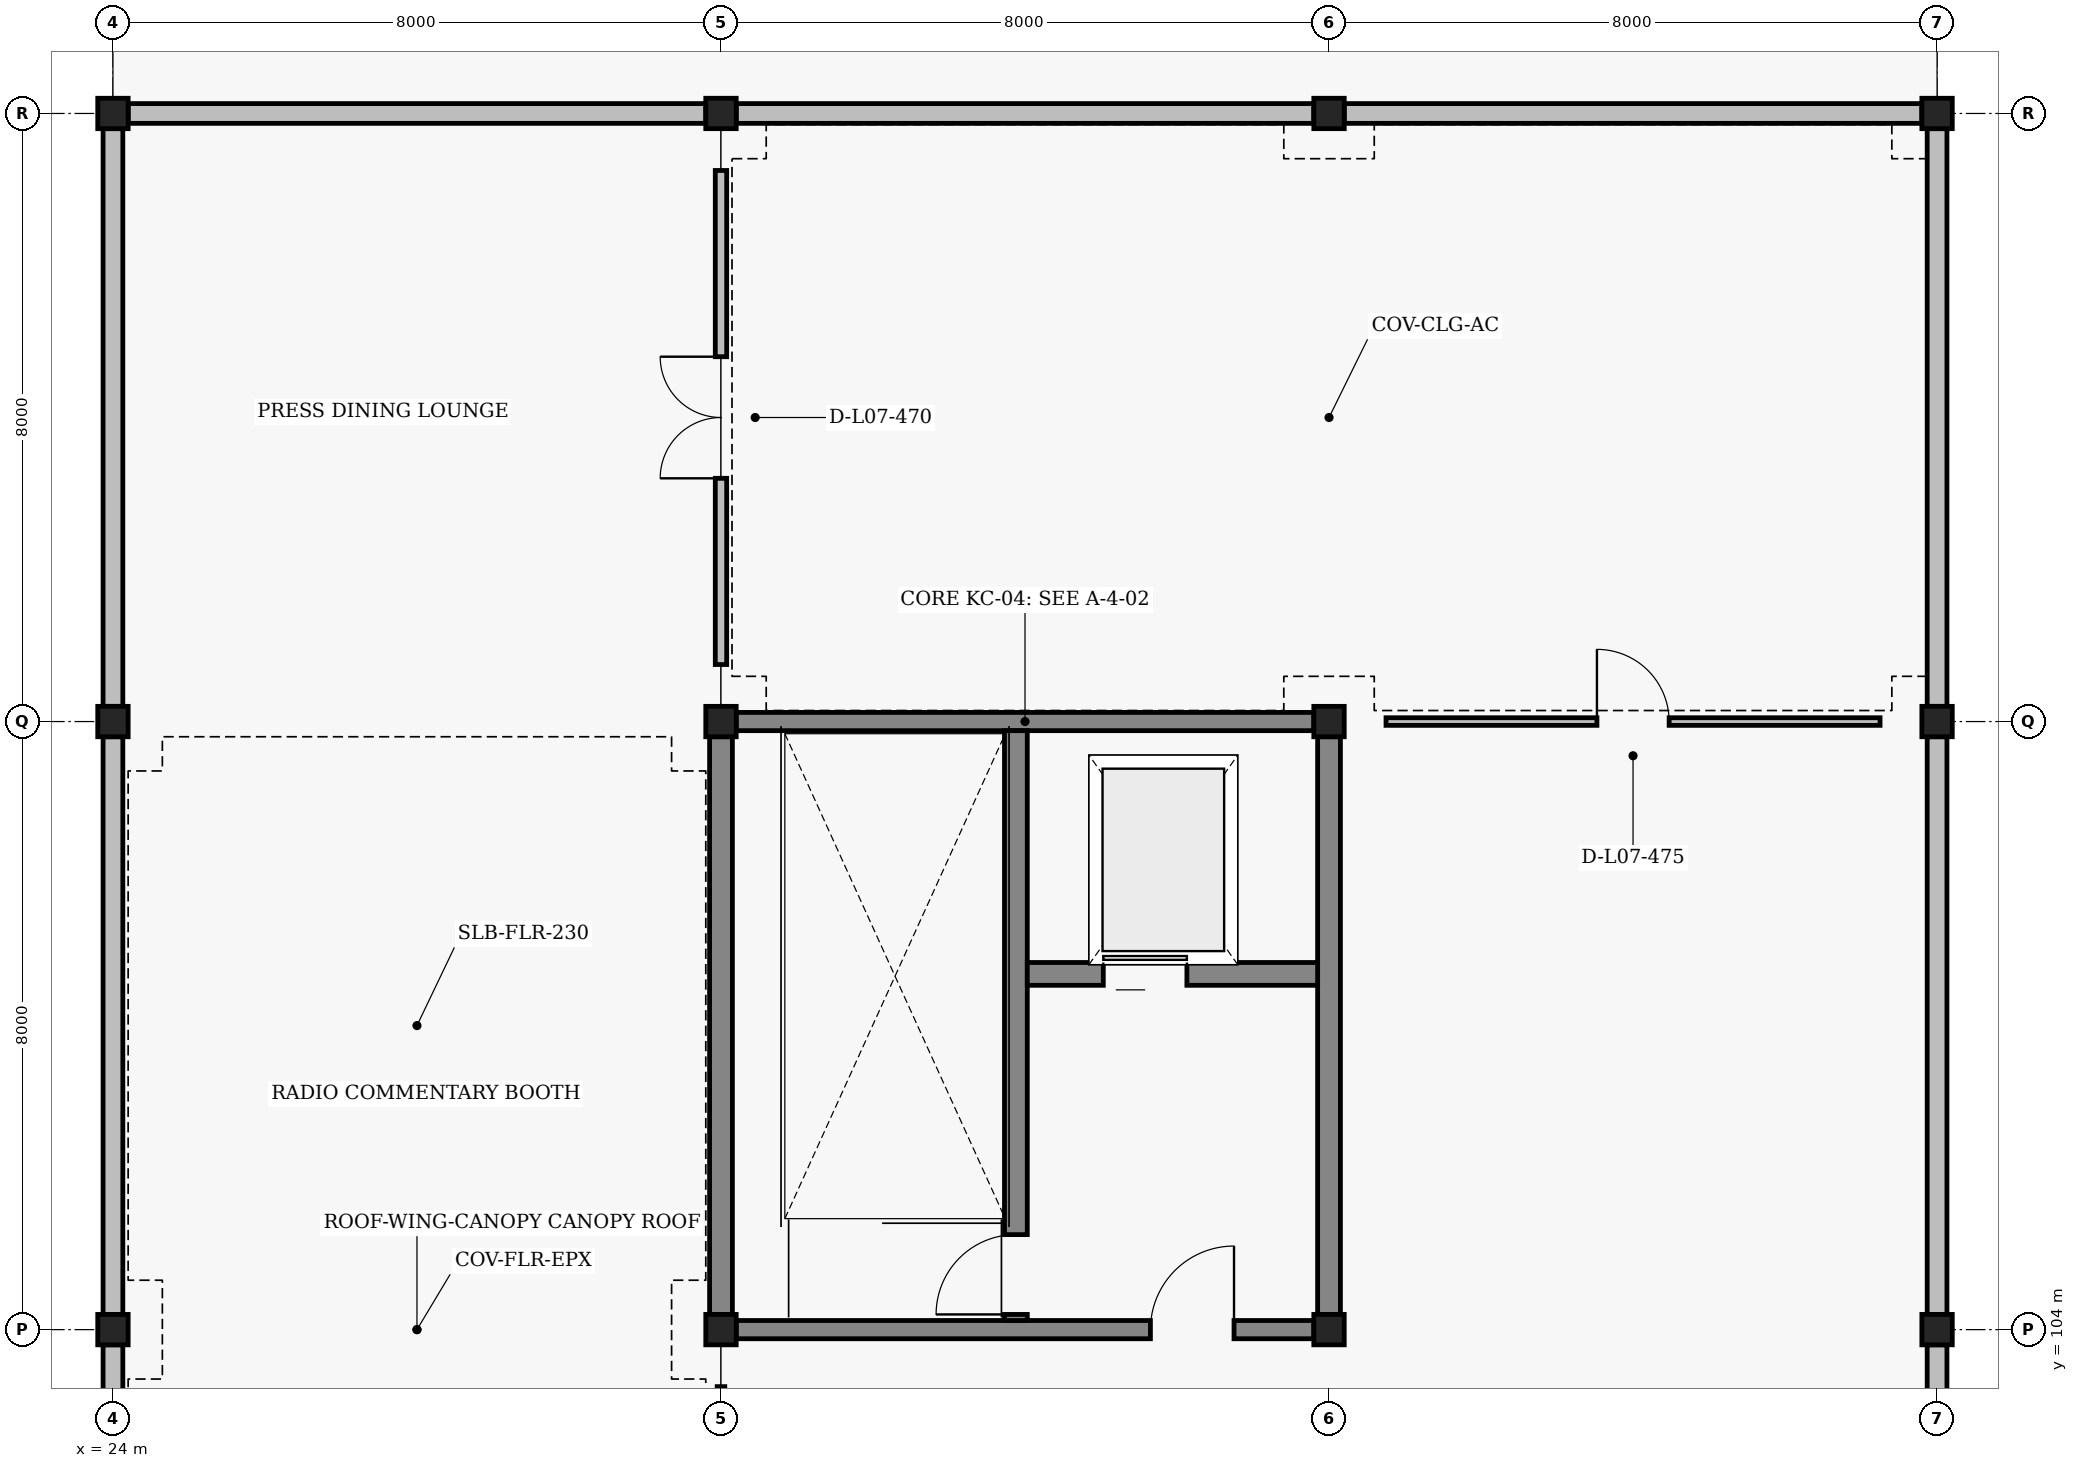
"""IFC4 building model, lengths in metres.
Left out: names, types, materials, properties, quantities, classifications, styles, units other than length and angle.
Written with IfcOpenShell. Run it as: python <this file> out.ifc"""

import sys

from ifc_helpers import new_model, si_unit, direction, frame, frame_2d, origin, origin_2d, place, context, subcontext, project, spatial, rectangle, i_section, extrude, element, fill, save


model = new_model("IFC4")
c1 = context("Model", 3, precision=1e-05, world=origin(), true_north=direction((0.0, 1.0)))
c2 = subcontext(c1, "Body", "Model", "MODEL_VIEW")
j1 = project(units=[si_unit("LENGTHUNIT", "METRE"), si_unit("PLANEANGLEUNIT", "RADIAN")], contexts=[c1])
p1 = place(None, origin())
s1 = spatial("IfcSite", under=j1, at=p1, CompositionType="ELEMENT")
p2 = place(p1, origin())
s2 = spatial("IfcBuilding", under=s1, at=p2, CompositionType="ELEMENT")
p3 = place(p2, frame((0.0, 0.0, 27.0)))
s3 = spatial("IfcBuildingStorey", under=s2, at=p3, CompositionType="ELEMENT", Elevation=27.0)
for number, where, z_axis, x_axis in (
    (1, (24.0, 104.0, 0.0), (0.0, 0.0, 1.0), (1.0, 0.0, 0.0)),
    (2, (24.0, 112.0, 0.0), (0.0, 0.0, 1.0), (1.0, 0.0, 0.0)),
    (3, (24.0, 120.0, 0.0), (0.0, 0.0, 1.0), (1.0, 0.0, 0.0)),
    (4, (32.0, 104.0, 0.0), (0.0, 0.0, 1.0), (1.0, 0.0, 0.0)),
    (5, (32.0, 112.0, 0.0), (0.0, 0.0, 1.0), (1.0, 0.0, 0.0)),
    (6, (32.0, 120.0, 0.0), (0.0, 0.0, 1.0), (1.0, 0.0, 0.0)),
    (7, (40.0, 104.0, 0.0), (0.0, 0.0, 1.0), (1.0, 0.0, 0.0)),
    (8, (40.0, 112.0, 0.0), (0.0, 0.0, 1.0), (1.0, 0.0, 0.0)),
    (9, (40.0, 120.0, 0.0), (0.0, 0.0, 1.0), (1.0, 0.0, 0.0)),
    (10, (48.0, 104.0, 0.0), (0.0, 0.0, 1.0), (1.0, 0.0, 0.0)),
    (11, (48.0, 112.0, 0.0), (0.0, 0.0, 1.0), (1.0, 0.0, 0.0)),
    (12, (48.0, 120.0, 0.0), (0.0, 0.0, 1.0), (1.0, 0.0, 0.0)),
):
    element("IfcColumn", number, at=place(p3, frame(where, z_axis=z_axis, x_axis=x_axis)), inside=s3, PredefinedType="COLUMN", context=c2, shape_type="SweptSolid", body=[
        extrude(i_section(OverallWidth=0.4, OverallDepth=0.4, WebThickness=0.013, FlangeThickness=0.021, at=origin_2d()), origin(), (0.0, 0.0, 1.0), 4.2),
    ])
for number, where, z_axis, x_axis in (
    (13, (24.0, 96.2, 0.0), (0.0, 0.0, 1.0), (0.0, 1.0, 0.0)),
    (14, (24.0, 104.2, 0.0), (0.0, 0.0, 1.0), (0.0, 1.0, 0.0)),
    (15, (24.2, 120.0, 0.0), (0.0, 0.0, 1.0), (1.0, 0.0, 0.0)),
    (16, (24.0, 112.2, 0.0), (0.0, 0.0, 1.0), (0.0, 1.0, 0.0)),
    (17, (32.2, 120.0, 0.0), (0.0, 0.0, 1.0), (1.0, 0.0, 0.0)),
    (18, (48.0, 96.2, 0.0), (0.0, 0.0, 1.0), (0.0, 1.0, 0.0)),
    (19, (48.0, 104.2, 0.0), (0.0, 0.0, 1.0), (0.0, 1.0, 0.0)),
    (20, (40.2, 120.0, 0.0), (0.0, 0.0, 1.0), (1.0, 0.0, 0.0)),
    (21, (48.0, 112.2, 0.0), (0.0, 0.0, 1.0), (0.0, 1.0, 0.0)),
):
    element("IfcWall", number, at=place(p3, frame(where, z_axis=z_axis, x_axis=x_axis)), inside=s3, PredefinedType="SOLIDWALL", context=c2, shape_type="SweptSolid", body=[
        extrude(rectangle(XDim=7.6, YDim=0.26, at=frame_2d((3.8, 0.0))), origin(), (0.0, 0.0, 1.0), 3.35),
    ])
p4 = place(p3, frame((32.2, 104.0, 0.0), z_axis=(0.0, 0.0, 1.0), x_axis=(1.0, 0.0, 0.0)))
e22 = element("IfcWall", 22, at=p4, inside=s3, PredefinedType="SHEAR", context=c2, shape_type="SweptSolid", body=[
    extrude(rectangle(XDim=7.6, YDim=0.24, at=frame_2d((3.8, 0.0))), origin(), (0.0, 0.0, 1.0), 3.37),
])
p5 = place(p4, frame((5.45, 0.0, 0.0)))
e23 = element("IfcOpeningElement", 23, at=p5, cuts=e22, PredefinedType="OPENING", context=c2, shape_type="SweptSolid", body=[
    extrude(rectangle(XDim=1.1, YDim=2.2, at=frame_2d((0.55, 1.1))), frame((0.0, 0.13, 0.0), z_axis=(0.0, -1.0, 0.0), x_axis=(1.0, 0.0, 0.0)), (0.0, 0.0, 1.0), 0.26),
])
p6 = place(p3, frame((32.2, 112.0, 0.0), z_axis=(0.0, 0.0, 1.0), x_axis=(1.0, 0.0, 0.0)))
e24 = element("IfcWall", 24, at=p6, inside=s3, PredefinedType="SHEAR", context=c2, shape_type="SweptSolid", body=[
    extrude(rectangle(XDim=7.6, YDim=0.24, at=frame_2d((3.8, 0.0))), origin(), (0.0, 0.0, 1.0), 3.37),
])
for number, where, z_axis, x_axis in (
    (25, (32.0, 104.2, 0.0), (0.0, 0.0, 1.0), (0.0, 1.0, 0.0)),
    (26, (40.0, 104.2, 0.0), (0.0, 0.0, 1.0), (0.0, 1.0, 0.0)),
):
    element("IfcWall", number, at=place(p3, frame(where, z_axis=z_axis, x_axis=x_axis)), inside=s3, PredefinedType="SHEAR", context=c2, shape_type="SweptSolid", body=[
        extrude(rectangle(XDim=7.6, YDim=0.3, at=frame_2d((3.8, 0.0))), origin(), (0.0, 0.0, 1.0), 3.37),
    ])
p7 = place(p3, frame((35.88, 104.12, 0.0), z_axis=(0.0, 0.0, 1.0), x_axis=(0.0, 1.0, 0.0)))
e27 = element("IfcWall", 27, at=p7, inside=s3, PredefinedType="SHEAR", context=c2, shape_type="SweptSolid", body=[
    extrude(rectangle(XDim=7.76, YDim=0.3, at=frame_2d((3.88, 0.0))), origin(), (0.0, 0.0, 1.0), 3.47),
])
p8 = place(p7, frame((0.08, 0.0, 0.0)))
e28 = element("IfcOpeningElement", 28, at=p8, cuts=e27, PredefinedType="OPENING", context=c2, shape_type="SweptSolid", body=[
    extrude(rectangle(XDim=1.05, YDim=2.15, at=frame_2d((0.525, 1.075))), frame((0.0, 0.16, 0.0), z_axis=(0.0, -1.0, 0.0), x_axis=(1.0, 0.0, 0.0)), (0.0, 0.0, 1.0), 0.32),
])
p9 = place(p3, frame((36.03, 108.68, 0.0), z_axis=(0.0, 0.0, 1.0), x_axis=(1.0, 0.0, 0.0)))
e29 = element("IfcWall", 29, at=p9, inside=s3, PredefinedType="SHEAR", context=c2, shape_type="SweptSolid", body=[
    extrude(rectangle(XDim=3.82, YDim=0.3, at=frame_2d((1.91, 0.0))), origin(), (0.0, 0.0, 1.0), 3.37),
])
p10 = place(p9, frame((1.0, 0.0, 0.0)))
e30 = element("IfcOpeningElement", 30, at=p10, cuts=e29, PredefinedType="OPENING", context=c2, shape_type="SweptSolid", body=[
    extrude(rectangle(XDim=1.1, YDim=2.15, at=frame_2d((0.55, 1.075))), frame((0.0, 0.16, 0.0), z_axis=(0.0, -1.0, 0.0), x_axis=(1.0, 0.0, 0.0)), (0.0, 0.0, 1.0), 0.32),
])
p11 = place(p3, frame((32.0, 96.75, 0.0), z_axis=(0.0, 0.0, 1.0), x_axis=(0.0, 1.0, 0.0)))
e31 = element("IfcWall", 31, at=p11, inside=s3, PredefinedType="PARTITIONING", context=c2, shape_type="SweptSolid", body=[
    extrude(rectangle(XDim=6.5, YDim=0.1, at=frame_2d((3.25, 0.0))), origin(), (0.0, 0.0, 1.0), 3.37),
])
p12 = place(p11, frame((2.775, 0.0, 0.0)))
e32 = element("IfcOpeningElement", 32, at=p12, cuts=e31, PredefinedType="OPENING", context=c2, shape_type="SweptSolid", body=[
    extrude(rectangle(XDim=0.95, YDim=2.1, at=frame_2d((0.475, 1.05))), frame((0.0, 0.06, 0.0), z_axis=(0.0, -1.0, 0.0), x_axis=(1.0, 0.0, 0.0)), (0.0, 0.0, 1.0), 0.12),
])
p13 = place(p3, frame((32.0, 112.75, 0.0), z_axis=(0.0, 0.0, 1.0), x_axis=(0.0, 1.0, 0.0)))
e33 = element("IfcWall", 33, at=p13, inside=s3, PredefinedType="PARTITIONING", context=c2, shape_type="SweptSolid", body=[
    extrude(rectangle(XDim=6.5, YDim=0.15, at=frame_2d((3.25, 0.0))), origin(), (0.0, 0.0, 1.0), 3.37),
])
p14 = place(p13, frame((2.45, 0.0, 0.0)))
e34 = element("IfcOpeningElement", 34, at=p14, cuts=e33, PredefinedType="OPENING", context=c2, shape_type="SweptSolid", body=[
    extrude(rectangle(XDim=1.6, YDim=2.2, at=frame_2d((0.8, 1.1))), frame((0.0, 0.085, 0.0), z_axis=(0.0, -1.0, 0.0), x_axis=(1.0, 0.0, 0.0)), (0.0, 0.0, 1.0), 0.17),
])
p15 = place(p3, frame((40.75, 112.0, 0.0), z_axis=(0.0, 0.0, 1.0), x_axis=(1.0, 0.0, 0.0)))
e35 = element("IfcWall", 35, at=p15, inside=s3, PredefinedType="PARTITIONING", context=c2, shape_type="SweptSolid", body=[
    extrude(rectangle(XDim=6.5, YDim=0.1, at=frame_2d((3.25, 0.0))), origin(), (0.0, 0.0, 1.0), 3.47),
])
p16 = place(p15, frame((2.775, 0.0, 0.0)))
e36 = element("IfcOpeningElement", 36, at=p16, cuts=e35, PredefinedType="OPENING", context=c2, shape_type="SweptSolid", body=[
    extrude(rectangle(XDim=0.95, YDim=2.1, at=frame_2d((0.475, 1.05))), frame((0.0, 0.06, 0.0), z_axis=(0.0, -1.0, 0.0), x_axis=(1.0, 0.0, 0.0)), (0.0, 0.0, 1.0), 0.12),
])
p17 = place(p5, origin())
e37 = element("IfcDoor", 37, at=p17, inside=s3, OperationType="SINGLE_SWING_RIGHT", PredefinedType="DOOR", context=c2, shape_type="SweptSolid", body=[
    extrude(rectangle(XDim=1.1, YDim=2.2, at=frame_2d((0.55, 1.1))), frame((0.0, 0.025, 0.0), z_axis=(0.0, -1.0, 0.0), x_axis=(1.0, 0.0, 0.0)), (0.0, 0.0, 1.0), 0.05),
])
fill(e23, e37)
p18 = place(p8, origin())
e38 = element("IfcDoor", 38, at=p18, inside=s3, OperationType="SINGLE_SWING_LEFT", PredefinedType="DOOR", context=c2, shape_type="SweptSolid", body=[
    extrude(rectangle(XDim=1.05, YDim=2.15, at=frame_2d((0.525, 1.075))), frame((0.0, 0.025, 0.0), z_axis=(0.0, -1.0, 0.0), x_axis=(1.0, 0.0, 0.0)), (0.0, 0.0, 1.0), 0.05),
])
fill(e28, e38)
p19 = place(p10, origin())
e39 = element("IfcDoor", 39, at=p19, inside=s3, OperationType="SLIDING_TO_LEFT", PredefinedType="DOOR", context=c2, shape_type="SweptSolid", body=[
    extrude(rectangle(XDim=1.1, YDim=2.15, at=frame_2d((0.55, 1.075))), frame((0.0, 0.025, 0.0), z_axis=(0.0, -1.0, 0.0), x_axis=(1.0, 0.0, 0.0)), (0.0, 0.0, 1.0), 0.05),
])
fill(e30, e39)
p20 = place(p14, origin())
e40 = element("IfcDoor", 40, at=p20, inside=s3, OperationType="DOUBLE_SWING_LEFT", PredefinedType="DOOR", context=c2, shape_type="SweptSolid", body=[
    extrude(rectangle(XDim=1.6, YDim=2.2, at=frame_2d((0.8, 1.1))), frame((0.0, 0.025, 0.0), z_axis=(0.0, -1.0, 0.0), x_axis=(1.0, 0.0, 0.0)), (0.0, 0.0, 1.0), 0.05),
])
fill(e34, e40)
p21 = place(p16, origin())
e41 = element("IfcDoor", 41, at=p21, inside=s3, OperationType="SINGLE_SWING_LEFT", PredefinedType="DOOR", context=c2, shape_type="SweptSolid", body=[
    extrude(rectangle(XDim=0.95, YDim=2.1, at=frame_2d((0.475, 1.05))), frame((0.0, 0.025, 0.0), z_axis=(0.0, -1.0, 0.0), x_axis=(1.0, 0.0, 0.0)), (0.0, 0.0, 1.0), 0.05),
])
fill(e36, e41)
save(model, sys.argv[1])
